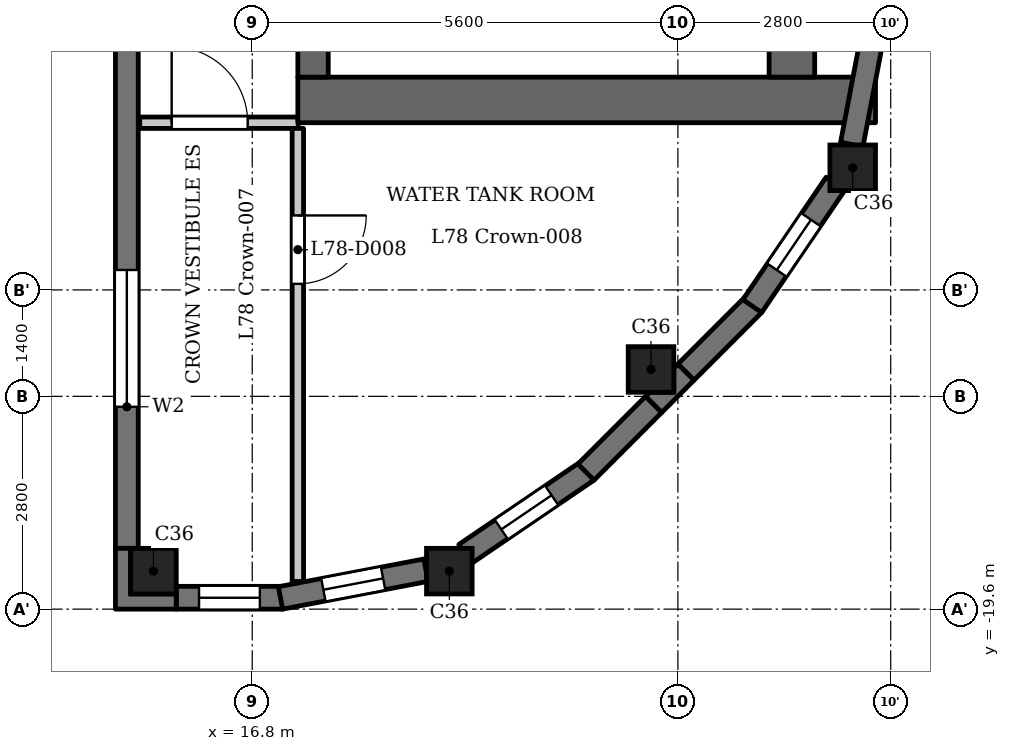
"""IFC4 building model, lengths in metres.
Left out: names, types, materials, properties, quantities, classifications, styles, units other than length and angle.
Written with IfcOpenShell. Run it as: python <this file> out.ifc"""

import sys

from ifc_helpers import new_model, si_unit, direction, frame, frame_2d, origin, origin_2d, place, context, subcontext, project, spatial, polyline, rectangle, outline, extrude, element, fill, save


model = new_model("IFC4")
c1 = context("Model", 3, precision=1e-05, world=origin(), true_north=direction((0.0, 1.0)))
c2 = subcontext(c1, "Body", "Model", "MODEL_VIEW")
j1 = project(units=[si_unit("LENGTHUNIT", "METRE"), si_unit("PLANEANGLEUNIT", "RADIAN")], contexts=[c1])
p1 = place(None, origin())
s1 = spatial("IfcSite", under=j1, at=p1, CompositionType="ELEMENT")
p2 = place(p1, origin())
s2 = spatial("IfcBuilding", under=s1, at=p2, CompositionType="ELEMENT")
p3 = place(p2, frame((0.0, 0.0, 303.4)))
s3 = spatial("IfcBuildingStorey", under=s2, at=p3, CompositionType="ELEMENT", Elevation=303.4)
for number, where, z_axis, x_axis in (
    (1, (15.5, -19.1, 0.0), (0.0, 0.0, 1.0), (1.0, 0.0, 0.0)),
    (2, (19.393, -19.1, 0.0), (0.0, 0.0, 1.0), (1.0, 0.0, 0.0)),
    (3, (22.046, -16.446, 0.0), (0.0, 0.0, 1.0), (1.0, 0.0, 0.0)),
    (4, (24.7, -13.793, 0.0), (0.0, 0.0, 1.0), (1.0, 0.0, 0.0)),
):
    element("IfcColumn", number, at=place(p3, frame(where, z_axis=z_axis, x_axis=x_axis)), inside=s3, PredefinedType="COLUMN", context=c2, shape_type="SweptSolid", body=[
        extrude(rectangle(XDim=0.6, YDim=0.6, at=origin_2d()), origin(), (0.0, 0.0, 1.0), 3.5),
    ])
p4 = place(p3, frame((15.15, -11.5, 0.0), z_axis=(0.0, 0.0, 1.0), x_axis=(0.0, -1.0, 0.0)))
e5 = element("IfcWall", 5, at=p4, inside=s3, PredefinedType="SOLIDWALL", context=c2, shape_type="SweptSolid", body=[
    extrude(rectangle(XDim=7.3, YDim=0.3, at=frame_2d((3.65, 0.0))), origin(), (0.0, 0.0, 1.0), 3.2),
])
p5 = place(p4, frame((3.637, 0.0, 0.9)))
e6 = element("IfcOpeningElement", 6, at=p5, cuts=e5, PredefinedType="OPENING", context=c2, shape_type="SweptSolid", body=[
    extrude(rectangle(XDim=1.8, YDim=1.25, at=frame_2d((0.9, 0.625))), frame((0.0, 0.16, 0.0), z_axis=(0.0, -1.0, 0.0), x_axis=(1.0, 0.0, 0.0)), (0.0, 0.0, 1.0), 0.32),
])
p6 = place(p3, frame((15.8, -19.45, 0.0), z_axis=(0.0, 0.0, 1.0), x_axis=(1.0, 0.0, 0.0)))
e7 = element("IfcWall", 7, at=p6, inside=s3, PredefinedType="SOLIDWALL", context=c2, shape_type="SweptSolid", body=[
    extrude(rectangle(XDim=1.4, YDim=0.3, at=frame_2d((0.7, 0.0))), origin(), (0.0, 0.0, 1.0), 3.2),
])
p7 = place(p6, frame((0.3, 0.0, 0.6)))
e8 = element("IfcOpeningElement", 8, at=p7, cuts=e7, PredefinedType="OPENING", context=c2, shape_type="SweptSolid", body=[
    extrude(rectangle(XDim=0.8, YDim=1.55, at=frame_2d((0.4, 0.775))), frame((0.0, 0.16, 0.0), z_axis=(0.0, -1.0, 0.0), x_axis=(1.0, 0.0, 0.0)), (0.0, 0.0, 1.0), 0.32),
])
p8 = place(p3, frame((17.172, -19.453, 0.0), z_axis=(0.0, 0.0, 1.0), x_axis=(0.982286967073, 0.187382801553, 0.0)))
e9 = element("IfcWall", 9, at=p8, inside=s3, PredefinedType="SOLIDWALL", context=c2, shape_type="SweptSolid", body=[
    extrude(rectangle(XDim=1.948, YDim=0.3, at=frame_2d((0.974, 0.0))), origin(), (0.0, 0.0, 1.0), 2.6),
])
p9 = place(p8, frame((0.574, 0.0, 0.6)))
e10 = element("IfcOpeningElement", 10, at=p9, cuts=e9, PredefinedType="OPENING", context=c2, shape_type="SweptSolid", body=[
    extrude(rectangle(XDim=0.8, YDim=1.55, at=frame_2d((0.4, 0.775))), frame((0.0, 0.16, 0.0), z_axis=(0.0, -1.0, 0.0), x_axis=(1.0, 0.0, 0.0)), (0.0, 0.0, 1.0), 0.32),
])
p10 = place(p3, frame((19.602, -18.874, 0.0), z_axis=(0.0, 0.0, 1.0), x_axis=(0.827022075481, 0.562169446579, 0.0)))
e11 = element("IfcWall", 11, at=p10, inside=s3, PredefinedType="SOLIDWALL", context=c2, shape_type="SweptSolid", body=[
    extrude(rectangle(XDim=1.948, YDim=0.3, at=frame_2d((0.974, 0.0))), origin(), (0.0, 0.0, 1.0), 2.6),
])
p11 = place(p10, frame((0.574, 0.0, 0.6)))
e12 = element("IfcOpeningElement", 12, at=p11, cuts=e11, PredefinedType="OPENING", context=c2, shape_type="SweptSolid", body=[
    extrude(rectangle(XDim=0.8, YDim=1.55, at=frame_2d((0.4, 0.775))), frame((0.0, 0.16, 0.0), z_axis=(0.0, -1.0, 0.0), x_axis=(1.0, 0.0, 0.0)), (0.0, 0.0, 1.0), 0.32),
])
for number, where, z_axis, x_axis in (
    (13, (21.191, -17.797, 0.0), (0.0, 0.0, 1.0), (0.707, 0.707, 0.0)),
    (14, (22.506, -16.482, 0.0), (0.0, 0.0, 1.0), (0.707, 0.707, 0.0)),
):
    element("IfcWall", number, at=place(p3, frame(where, z_axis=z_axis, x_axis=x_axis)), inside=s3, PredefinedType="SOLIDWALL", context=c2, shape_type="SweptSolid", body=[
        extrude(rectangle(XDim=1.26, YDim=0.3, at=frame_2d((0.63, 0.0))), origin(), (0.0, 0.0, 1.0), 3.2),
    ])
p12 = place(p3, frame((23.379, -15.613, 0.0), z_axis=(0.0, 0.0, 1.0), x_axis=(0.562025435703, 0.827119948752, 0.0)))
e15 = element("IfcWall", 15, at=p12, inside=s3, PredefinedType="SOLIDWALL", context=c2, shape_type="SweptSolid", body=[
    extrude(rectangle(XDim=1.948, YDim=0.3, at=frame_2d((0.974, 0.0))), origin(), (0.0, 0.0, 1.0), 2.6),
])
p13 = place(p12, frame((0.574, 0.0, 0.6)))
e16 = element("IfcOpeningElement", 16, at=p13, cuts=e15, PredefinedType="OPENING", context=c2, shape_type="SweptSolid", body=[
    extrude(rectangle(XDim=0.8, YDim=1.55, at=frame_2d((0.4, 0.775))), frame((0.0, 0.16, 0.0), z_axis=(0.0, -1.0, 0.0), x_axis=(1.0, 0.0, 0.0)), (0.0, 0.0, 1.0), 0.32),
])
p14 = place(p3, frame((24.688, -13.485, 0.0), z_axis=(0.0, 0.0, 1.0), x_axis=(0.187354129902, 0.982292436095, 0.0)))
e17 = element("IfcWall", 17, at=p14, inside=s3, PredefinedType="SOLIDWALL", context=c2, shape_type="SweptSolid", body=[
    extrude(rectangle(XDim=1.947, YDim=0.3, at=frame_2d((0.973, 0.0))), origin(), (0.0, 0.0, 1.0), 2.6),
])
p15 = place(p3, frame((17.4, -12.9, 0.0), z_axis=(0.0, 0.0, 1.0), x_axis=(1.0, 0.0, 0.0)))
e18 = element("IfcWall", 18, at=p15, inside=s3, PredefinedType="SHEAR", context=c2, shape_type="SweptSolid", body=[
    extrude(rectangle(XDim=7.6, YDim=0.6, at=frame_2d((3.8, 0.0))), origin(), (0.0, 0.0, 1.0), 3.2),
])
p16 = place(p3, frame((17.6, -12.6, 0.0), z_axis=(0.0, 0.0, 1.0), x_axis=(0.0, 1.0, 0.0)))
e19 = element("IfcWall", 19, at=p16, inside=s3, PredefinedType="SHEAR", context=c2, shape_type="SweptSolid", body=[
    extrude(rectangle(XDim=25.2, YDim=0.4, at=frame_2d((12.6, 0.0))), origin(), (0.0, 0.0, 1.0), 3.2),
])
p17 = place(p16, frame((8.8, 0.0, 0.0)))
e20 = element("IfcOpeningElement", 20, at=p17, cuts=e19, PredefinedType="OPENING", context=c2, shape_type="SweptSolid", body=[
    extrude(rectangle(XDim=0.9, YDim=2.1, at=frame_2d((0.45, 1.05))), frame((0.0, 0.21, 0.0), z_axis=(0.0, -1.0, 0.0), x_axis=(1.0, 0.0, 0.0)), (0.0, 0.0, 1.0), 0.42),
])
p18 = place(p16, frame((17.05, 0.0, 0.0)))
e21 = element("IfcOpeningElement", 21, at=p18, cuts=e19, PredefinedType="OPENING", context=c2, shape_type="SweptSolid", body=[
    extrude(rectangle(XDim=0.9, YDim=2.1, at=frame_2d((0.45, 1.05))), frame((0.0, 0.21, 0.0), z_axis=(0.0, -1.0, 0.0), x_axis=(1.0, 0.0, 0.0)), (0.0, 0.0, 1.0), 0.42),
])
p19 = place(p16, frame((23.25, 0.0, 0.0)))
e22 = element("IfcOpeningElement", 22, at=p19, cuts=e19, PredefinedType="OPENING", context=c2, shape_type="SweptSolid", body=[
    extrude(rectangle(XDim=1.1, YDim=2.1, at=frame_2d((0.55, 1.05))), frame((0.0, 0.21, 0.0), z_axis=(0.0, -1.0, 0.0), x_axis=(1.0, 0.0, 0.0)), (0.0, 0.0, 1.0), 0.42),
])
p20 = place(p16, frame((0.85, 0.0, 0.0)))
e23 = element("IfcOpeningElement", 23, at=p20, cuts=e19, PredefinedType="OPENING", context=c2, shape_type="SweptSolid", body=[
    extrude(rectangle(XDim=1.1, YDim=2.1, at=frame_2d((0.55, 1.05))), frame((0.0, 0.21, 0.0), z_axis=(0.0, -1.0, 0.0), x_axis=(1.0, 0.0, 0.0)), (0.0, 0.0, 1.0), 0.42),
])
p21 = place(p16, frame((13.075, 0.0, 0.0)))
e24 = element("IfcOpeningElement", 24, at=p21, cuts=e19, PredefinedType="OPENING", context=c2, shape_type="SweptSolid", body=[
    extrude(rectangle(XDim=1.8, YDim=2.1, at=frame_2d((0.9, 1.05))), frame((0.0, 0.21, 0.0), z_axis=(0.0, -1.0, 0.0), x_axis=(1.0, 0.0, 0.0)), (0.0, 0.0, 1.0), 0.42),
])
p22 = place(p3, frame((23.9, -12.6, 0.0), z_axis=(0.0, 0.0, 1.0), x_axis=(0.0, 1.0, 0.0)))
e25 = element("IfcWall", 25, at=p22, inside=s3, PredefinedType="SHEAR", context=c2, shape_type="SweptSolid", body=[
    extrude(rectangle(XDim=25.2, YDim=0.6, at=frame_2d((12.6, 0.0))), origin(), (0.0, 0.0, 1.0), 3.2),
])
p23 = place(p3, frame((15.32, -13.2, 0.0), z_axis=(0.0, 0.0, 1.0), x_axis=(1.0, 0.0, 0.0)))
e26 = element("IfcWall", 26, at=p23, inside=s3, PredefinedType="PARTITIONING", context=c2, shape_type="SweptSolid", body=[
    extrude(rectangle(XDim=2.085, YDim=0.15, at=frame_2d((1.042, 0.0))), origin(), (0.0, 0.0, 1.0), 3.2),
])
p24 = place(p23, frame((0.42, 0.0, 0.0)))
e27 = element("IfcOpeningElement", 27, at=p24, cuts=e26, PredefinedType="OPENING", context=c2, shape_type="SweptSolid", body=[
    extrude(rectangle(XDim=1.0, YDim=2.1, at=frame_2d((0.5, 1.05))), frame((0.0, 0.085, 0.0), z_axis=(0.0, -1.0, 0.0), x_axis=(1.0, 0.0, 0.0)), (0.0, 0.0, 1.0), 0.17),
])
p25 = place(p3, frame((17.4, -19.236, 0.0), z_axis=(0.0, 0.0, 1.0), x_axis=(0.0, 1.0, 0.0)))
e28 = element("IfcWall", 28, at=p25, inside=s3, PredefinedType="PARTITIONING", context=c2, shape_type="SweptSolid", body=[
    extrude(rectangle(XDim=5.961, YDim=0.15, at=frame_2d((2.981, 0.0))), origin(), (0.0, 0.0, 1.0), 3.2),
])
p26 = place(p25, frame((3.917, 0.0, 0.0)))
e29 = element("IfcOpeningElement", 29, at=p26, cuts=e28, PredefinedType="OPENING", context=c2, shape_type="SweptSolid", body=[
    extrude(rectangle(XDim=0.9, YDim=2.1, at=frame_2d((0.45, 1.05))), frame((0.0, 0.085, 0.0), z_axis=(0.0, -1.0, 0.0), x_axis=(1.0, 0.0, 0.0)), (0.0, 0.0, 1.0), 0.17),
])
p27 = place(p3, origin())
e30 = element("IfcWall", 30, at=p27, inside=s3, PredefinedType="SOLIDWALL", context=c2, shape_type="SweptSolid", body=[
    extrude(outline(polyline([(21.976, -16.8), (22.188, -17.012), (22.612, -16.588), (22.4, -16.376), (22.346, -16.429), (22.346, -16.746), (22.029, -16.746), (21.976, -16.8)])), origin(), (0.0, 0.0, 1.0), 3.2),
])
e31 = element("IfcWall", 31, at=p27, inside=s3, PredefinedType="SOLIDWALL", context=c2, shape_type="SweptSolid", body=[
    extrude(outline(polyline([(15.0, -18.8), (15.0, -19.6), (15.8, -19.6), (15.8, -19.4), (15.2, -19.4), (15.2, -18.8), (15.0, -18.8)])), origin(), (0.0, 0.0, 1.0), 3.2),
])
p28 = place(p24, origin())
e32 = element("IfcDoor", 32, at=p28, inside=s3, OperationType="SINGLE_SWING_RIGHT", PredefinedType="DOOR", context=c2, shape_type="SweptSolid", body=[
    extrude(rectangle(XDim=1.0, YDim=2.1, at=frame_2d((0.5, 1.05))), frame((0.0, 0.025, 0.0), z_axis=(0.0, -1.0, 0.0), x_axis=(1.0, 0.0, 0.0)), (0.0, 0.0, 1.0), 0.05),
])
fill(e27, e32)
p29 = place(p26, origin())
e33 = element("IfcDoor", 33, at=p29, inside=s3, OperationType="SINGLE_SWING_RIGHT", PredefinedType="DOOR", context=c2, shape_type="SweptSolid", body=[
    extrude(rectangle(XDim=0.9, YDim=2.1, at=frame_2d((0.45, 1.05))), frame((0.0, 0.025, 0.0), z_axis=(0.0, -1.0, 0.0), x_axis=(1.0, 0.0, 0.0)), (0.0, 0.0, 1.0), 0.05),
])
fill(e29, e33)
p30 = place(p5, origin())
e34 = element("IfcWindow", 34, at=p30, inside=s3, PartitioningType="SINGLE_PANEL", PredefinedType="WINDOW", context=c2, shape_type="SweptSolid", body=[
    extrude(rectangle(XDim=1.8, YDim=1.25, at=frame_2d((0.9, 0.625))), frame((0.0, 0.03, 0.0), z_axis=(0.0, -1.0, 0.0), x_axis=(1.0, 0.0, 0.0)), (0.0, 0.0, 1.0), 0.06),
])
fill(e6, e34)
p31 = place(p7, origin())
e35 = element("IfcWindow", 35, at=p31, inside=s3, PartitioningType="SINGLE_PANEL", PredefinedType="WINDOW", context=c2, shape_type="SweptSolid", body=[
    extrude(rectangle(XDim=0.8, YDim=1.55, at=frame_2d((0.4, 0.775))), frame((0.0, 0.03, 0.0), z_axis=(0.0, -1.0, 0.0), x_axis=(1.0, 0.0, 0.0)), (0.0, 0.0, 1.0), 0.06),
])
fill(e8, e35)
p32 = place(p9, origin())
e36 = element("IfcWindow", 36, at=p32, inside=s3, PartitioningType="SINGLE_PANEL", PredefinedType="WINDOW", context=c2, shape_type="SweptSolid", body=[
    extrude(rectangle(XDim=0.8, YDim=1.55, at=frame_2d((0.4, 0.775))), frame((0.0, 0.03, 0.0), z_axis=(0.0, -1.0, 0.0), x_axis=(1.0, 0.0, 0.0)), (0.0, 0.0, 1.0), 0.06),
])
fill(e10, e36)
p33 = place(p11, origin())
e37 = element("IfcWindow", 37, at=p33, inside=s3, PartitioningType="SINGLE_PANEL", PredefinedType="WINDOW", context=c2, shape_type="SweptSolid", body=[
    extrude(rectangle(XDim=0.8, YDim=1.55, at=frame_2d((0.4, 0.775))), frame((0.0, 0.03, 0.0), z_axis=(0.0, -1.0, 0.0), x_axis=(1.0, 0.0, 0.0)), (0.0, 0.0, 1.0), 0.06),
])
fill(e12, e37)
p34 = place(p13, origin())
e38 = element("IfcWindow", 38, at=p34, inside=s3, PartitioningType="SINGLE_PANEL", PredefinedType="WINDOW", context=c2, shape_type="SweptSolid", body=[
    extrude(rectangle(XDim=0.8, YDim=1.55, at=frame_2d((0.4, 0.775))), frame((0.0, 0.03, 0.0), z_axis=(0.0, -1.0, 0.0), x_axis=(1.0, 0.0, 0.0)), (0.0, 0.0, 1.0), 0.06),
])
fill(e16, e38)
save(model, sys.argv[1])
